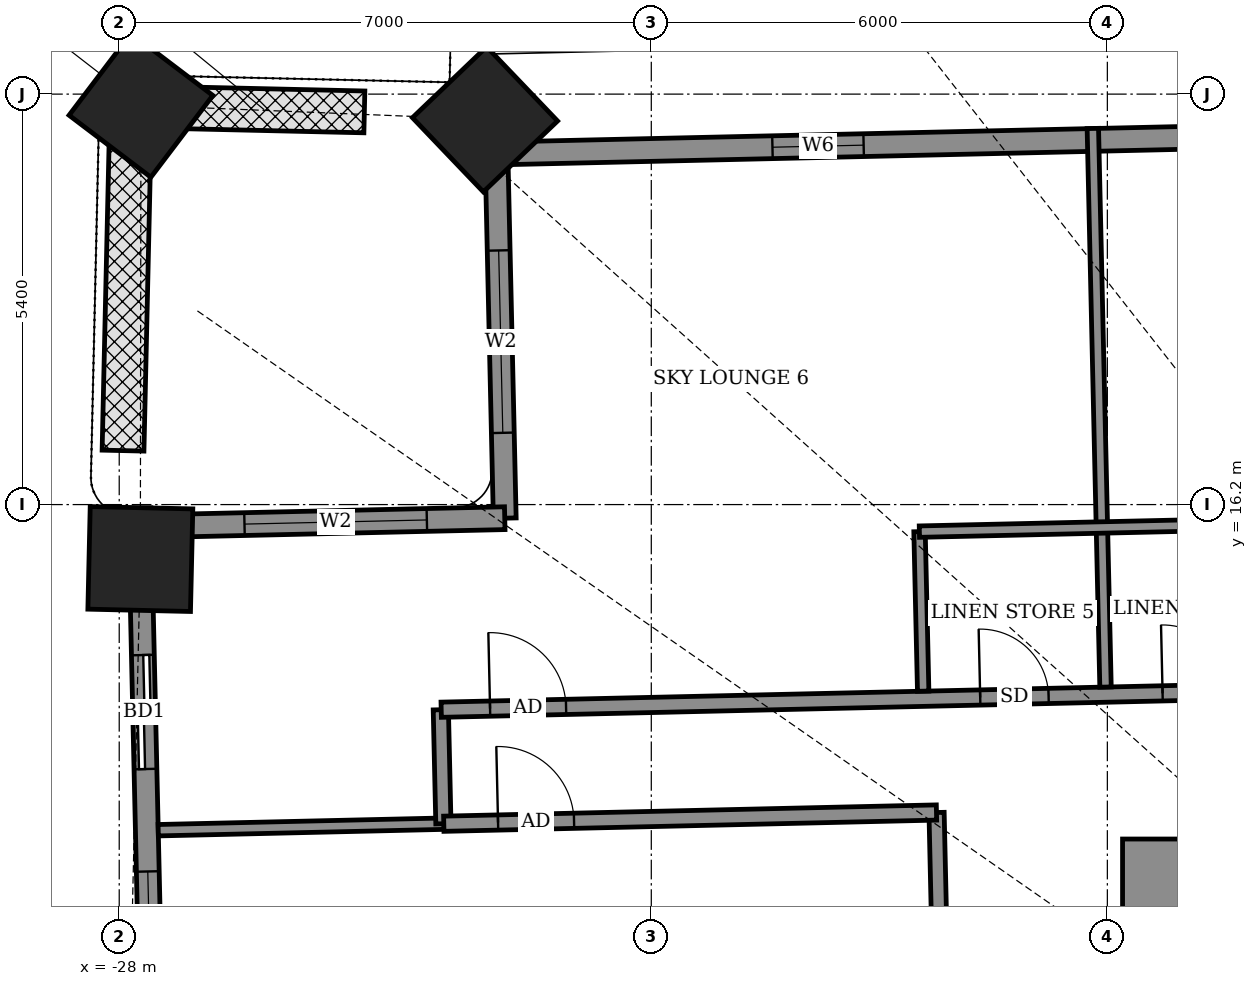
"""IFC4 building model, lengths in metres.
Left out: names, types, materials, properties, quantities, classifications, styles, units other than length and angle.
Written with IfcOpenShell. Run it as: python <this file> out.ifc"""

import sys

from ifc_helpers import new_model, si_unit, direction, frame, frame_2d, origin, origin_2d, place, context, subcontext, project, spatial, rectangle, extrude, element, fill, save


model = new_model("IFC4")
c1 = context("Model", 3, precision=1e-05, world=origin(), true_north=direction((0.0, 1.0)))
c2 = subcontext(c1, "Body", "Model", "MODEL_VIEW")
j1 = project(units=[si_unit("LENGTHUNIT", "METRE"), si_unit("PLANEANGLEUNIT", "RADIAN")], contexts=[c1])
p1 = place(None, origin())
s1 = spatial("IfcSite", under=j1, at=p1, CompositionType="ELEMENT")
p2 = place(p1, origin())
s2 = spatial("IfcBuilding", under=s1, at=p2, CompositionType="ELEMENT")
p3 = place(p2, frame((0.0, 0.0, 125.5)))
s3 = spatial("IfcBuildingStorey", under=s2, at=p3, CompositionType="ELEMENT", Elevation=125.5)
for number, where, z_axis, x_axis in (
    (1, (-23.188, 21.268, -0.55), (0.0, 0.0, 1.0), (-0.723, -0.691, 0.0)),
    (2, (-27.714, 21.452, -0.55), (0.0, 0.0, 1.0), (-0.604, -0.797, 0.0)),
    (3, (-27.722, 15.484, -0.55), (0.0, 0.0, 1.0), (-0.023, -1.0, 0.0)),
):
    element("IfcColumn", number, at=place(p3, frame(where, z_axis=z_axis, x_axis=x_axis)), inside=s3, PredefinedType="COLUMN", context=c2, shape_type="SweptSolid", body=[
        extrude(rectangle(XDim=1.35, YDim=1.35, at=origin_2d()), origin(), (0.0, 0.0, 1.0), 4.6),
    ])
p4 = place(p3, frame((19.396, 21.782, 0.0), z_axis=(0.0, 0.0, 1.0), x_axis=(-0.999742636707, -0.022686126826, 0.0)))
e4 = element("IfcWall", 4, at=p4, inside=s3, PredefinedType="SOLIDWALL", context=c2, shape_type="SweptSolid", body=[
    extrude(rectangle(XDim=42.444, YDim=0.3, at=frame_2d((21.222, 0.0))), origin(), (0.0, 0.0, 1.0), 2.35),
])
p5 = place(p4, frame((3.097, 0.0, 0.0)))
e5 = element("IfcOpeningElement", 5, at=p5, cuts=e4, PredefinedType="OPENING", context=c2, shape_type="SweptSolid", body=[
    extrude(rectangle(XDim=1.5, YDim=2.0, at=frame_2d((0.75, 1.0))), frame((0.0, 0.16, 0.0), z_axis=(0.0, -1.0, 0.0), x_axis=(1.0, 0.0, 0.0)), (0.0, 0.0, 1.0), 0.32),
])
p6 = place(p4, frame((11.269, 0.0, 0.5)))
e6 = element("IfcOpeningElement", 6, at=p6, cuts=e4, PredefinedType="OPENING", context=c2, shape_type="SweptSolid", body=[
    extrude(rectangle(XDim=1.2, YDim=1.1, at=frame_2d((0.6, 0.55))), frame((0.0, 0.16, 0.0), z_axis=(0.0, -1.0, 0.0), x_axis=(1.0, 0.0, 0.0)), (0.0, 0.0, 1.0), 0.32),
])
p7 = place(p4, frame((17.594, 0.0, 0.0)))
e7 = element("IfcOpeningElement", 7, at=p7, cuts=e4, PredefinedType="OPENING", context=c2, shape_type="SweptSolid", body=[
    extrude(rectangle(XDim=1.5, YDim=2.0, at=frame_2d((0.75, 1.0))), frame((0.0, 0.16, 0.0), z_axis=(0.0, -1.0, 0.0), x_axis=(1.0, 0.0, 0.0)), (0.0, 0.0, 1.0), 0.32),
])
p8 = place(p4, frame((22.919, 0.0, 0.0)))
e8 = element("IfcOpeningElement", 8, at=p8, cuts=e4, PredefinedType="OPENING", context=c2, shape_type="SweptSolid", body=[
    extrude(rectangle(XDim=1.5, YDim=2.0, at=frame_2d((0.75, 1.0))), frame((0.0, 0.16, 0.0), z_axis=(0.0, -1.0, 0.0), x_axis=(1.0, 0.0, 0.0)), (0.0, 0.0, 1.0), 0.32),
])
p9 = place(p4, frame((29.969, 0.0, 0.5)))
e9 = element("IfcOpeningElement", 9, at=p9, cuts=e4, PredefinedType="OPENING", context=c2, shape_type="SweptSolid", body=[
    extrude(rectangle(XDim=1.2, YDim=1.1, at=frame_2d((0.6, 0.55))), frame((0.0, 0.16, 0.0), z_axis=(0.0, -1.0, 0.0), x_axis=(1.0, 0.0, 0.0)), (0.0, 0.0, 1.0), 0.32),
])
p10 = place(p4, frame((37.612, 0.0, 0.5)))
e10 = element("IfcOpeningElement", 10, at=p10, cuts=e4, PredefinedType="OPENING", context=c2, shape_type="SweptSolid", body=[
    extrude(rectangle(XDim=1.2, YDim=1.1, at=frame_2d((0.6, 0.55))), frame((0.0, 0.16, 0.0), z_axis=(0.0, -1.0, 0.0), x_axis=(1.0, 0.0, 0.0)), (0.0, 0.0, 1.0), 0.32),
])
p11 = place(p3, frame((-23.037, 20.819, 0.0), z_axis=(0.0, 0.0, 1.0), x_axis=(0.022738738327, -0.999741441463, 0.0)))
e11 = element("IfcWall", 11, at=p11, inside=s3, PredefinedType="SOLIDWALL", context=c2, shape_type="SweptSolid", body=[
    extrude(rectangle(XDim=4.799, YDim=0.3, at=frame_2d((2.4, 0.0))), origin(), (0.0, 0.0, 1.0), 2.55),
])
p12 = place(p11, frame((1.276, 0.0, 0.9)))
e12 = element("IfcOpeningElement", 12, at=p12, cuts=e11, PredefinedType="OPENING", context=c2, shape_type="SweptSolid", body=[
    extrude(rectangle(XDim=2.4, YDim=1.5, at=frame_2d((1.2, 0.75))), frame((0.0, 0.16, 0.0), z_axis=(0.0, -1.0, 0.0), x_axis=(1.0, 0.0, 0.0)), (0.0, 0.0, 1.0), 0.32),
])
p13 = place(p3, frame((-22.928, 16.021, 0.0), z_axis=(0.0, 0.0, 1.0), x_axis=(-0.999742701292, -0.022683280499, 0.0)))
e13 = element("IfcWall", 13, at=p13, inside=s3, PredefinedType="SOLIDWALL", context=c2, shape_type="SweptSolid", body=[
    extrude(rectangle(XDim=4.8, YDim=0.3, at=frame_2d((2.4, 0.0))), origin(), (0.0, 0.0, 1.0), 2.55),
])
p14 = place(p13, frame((1.025, 0.0, 0.9)))
e14 = element("IfcOpeningElement", 14, at=p14, cuts=e13, PredefinedType="OPENING", context=c2, shape_type="SweptSolid", body=[
    extrude(rectangle(XDim=2.4, YDim=1.5, at=frame_2d((1.2, 0.75))), frame((0.0, 0.16, 0.0), z_axis=(0.0, -1.0, 0.0), x_axis=(1.0, 0.0, 0.0)), (0.0, 0.0, 1.0), 0.32),
])
p15 = place(p3, frame((-27.733, 16.154, 0.0), z_axis=(0.0, 0.0, 1.0), x_axis=(0.022721884592, -0.999741824653, 0.0)))
e15 = element("IfcWall", 15, at=p15, inside=s3, PredefinedType="SOLIDWALL", context=c2, shape_type="SweptSolid", body=[
    extrude(rectangle(XDim=11.572, YDim=0.3, at=frame_2d((5.786, 0.0))), origin(), (0.0, 0.0, 1.0), 2.65),
])
p16 = place(p15, frame((1.934, 0.0, 0.0)))
e16 = element("IfcOpeningElement", 16, at=p16, cuts=e15, PredefinedType="OPENING", context=c2, shape_type="SweptSolid", body=[
    extrude(rectangle(XDim=1.5, YDim=2.4, at=frame_2d((0.75, 1.2))), frame((0.0, 0.16, 0.0), z_axis=(0.0, -1.0, 0.0), x_axis=(1.0, 0.0, 0.0)), (0.0, 0.0, 1.0), 0.32),
])
p17 = place(p15, frame((4.782, 0.0, 0.9)))
e17 = element("IfcOpeningElement", 17, at=p17, cuts=e15, PredefinedType="OPENING", context=c2, shape_type="SweptSolid", body=[
    extrude(rectangle(XDim=1.2, YDim=1.5, at=frame_2d((0.6, 0.75))), frame((0.0, 0.16, 0.0), z_axis=(0.0, -1.0, 0.0), x_axis=(1.0, 0.0, 0.0)), (0.0, 0.0, 1.0), 0.32),
])
p18 = place(p15, frame((8.324, 0.0, 0.9)))
e18 = element("IfcOpeningElement", 18, at=p18, cuts=e15, PredefinedType="OPENING", context=c2, shape_type="SweptSolid", body=[
    extrude(rectangle(XDim=2.4, YDim=1.5, at=frame_2d((1.2, 0.75))), frame((0.0, 0.16, 0.0), z_axis=(0.0, -1.0, 0.0), x_axis=(1.0, 0.0, 0.0)), (0.0, 0.0, 1.0), 0.32),
])
p19 = place(p3, frame((-27.95, 16.91, 0.0), z_axis=(0.0, 0.0, 1.0), x_axis=(0.022730891996, 0.999741619894, 0.0)))
e19 = element("IfcWall", 19, at=p19, inside=s3, PredefinedType="USERDEFINED", context=c2, shape_type="SweptSolid", body=[
    extrude(rectangle(XDim=4.092, YDim=0.55, at=frame_2d((2.046, 0.0))), origin(), (0.0, 0.0, 1.0), 0.8),
])
p20 = place(p3, frame((-27.412, 21.426, 0.0), z_axis=(0.0, 0.0, 1.0), x_axis=(0.999740783297, -0.022767657165, 0.0)))
e20 = element("IfcWall", 20, at=p20, inside=s3, PredefinedType="USERDEFINED", context=c2, shape_type="SweptSolid", body=[
    extrude(rectangle(XDim=2.638, YDim=0.55, at=frame_2d((1.319, 0.0))), origin(), (0.0, 0.0, 1.0), 0.8),
])
p21 = place(p3, frame((-16.603, -16.218, 0.0), z_axis=(0.0, 0.0, 1.0), x_axis=(-0.022698146637, 0.999742363881, 0.0)))
e21 = element("IfcWall", 21, at=p21, inside=s3, PredefinedType="PARTITIONING", context=c2, shape_type="SweptSolid", body=[
    extrude(rectangle(XDim=28.374, YDim=0.2, at=frame_2d((14.187, 0.0))), origin(), (0.0, 0.0, 1.0), 2.55),
])
p22 = place(p21, frame((21.524, 0.0, 0.0)))
e22 = element("IfcOpeningElement", 22, at=p22, cuts=e21, PredefinedType="OPENING", context=c2, shape_type="SweptSolid", body=[
    extrude(rectangle(XDim=1.0, YDim=2.1, at=frame_2d((0.5, 1.05))), frame((0.0, 0.11, 0.0), z_axis=(0.0, -1.0, 0.0), x_axis=(1.0, 0.0, 0.0)), (0.0, 0.0, 1.0), 0.22),
])
p23 = place(p21, frame((23.699, 0.0, 0.0)))
e23 = element("IfcOpeningElement", 23, at=p23, cuts=e21, PredefinedType="OPENING", context=c2, shape_type="SweptSolid", body=[
    extrude(rectangle(XDim=0.9, YDim=2.1, at=frame_2d((0.45, 1.05))), frame((0.0, 0.11, 0.0), z_axis=(0.0, -1.0, 0.0), x_axis=(1.0, 0.0, 0.0)), (0.0, 0.0, 1.0), 0.22),
])
p24 = place(p21, frame((17.124, 0.0, 0.0)))
e24 = element("IfcOpeningElement", 24, at=p24, cuts=e21, PredefinedType="OPENING", context=c2, shape_type="SweptSolid", body=[
    extrude(rectangle(XDim=1.0, YDim=2.1, at=frame_2d((0.5, 1.05))), frame((0.0, 0.11, 0.0), z_axis=(0.0, -1.0, 0.0), x_axis=(1.0, 0.0, 0.0)), (0.0, 0.0, 1.0), 0.22),
])
p25 = place(p21, frame((19.449, 0.0, 0.0)))
e25 = element("IfcOpeningElement", 25, at=p25, cuts=e21, PredefinedType="OPENING", context=c2, shape_type="SweptSolid", body=[
    extrude(rectangle(XDim=0.9, YDim=2.1, at=frame_2d((0.45, 1.05))), frame((0.0, 0.11, 0.0), z_axis=(0.0, -1.0, 0.0), x_axis=(1.0, 0.0, 0.0)), (0.0, 0.0, 1.0), 0.22),
])
p26 = place(p21, frame((14.849, 0.0, 0.0)))
e26 = element("IfcOpeningElement", 26, at=p26, cuts=e21, PredefinedType="OPENING", context=c2, shape_type="SweptSolid", body=[
    extrude(rectangle(XDim=1.0, YDim=2.1, at=frame_2d((0.5, 1.05))), frame((0.0, 0.11, 0.0), z_axis=(0.0, -1.0, 0.0), x_axis=(1.0, 0.0, 0.0)), (0.0, 0.0, 1.0), 0.22),
])
p27 = place(p21, frame((12.399, 0.0, 0.0)))
e27 = element("IfcOpeningElement", 27, at=p27, cuts=e21, PredefinedType="OPENING", context=c2, shape_type="SweptSolid", body=[
    extrude(rectangle(XDim=0.9, YDim=2.1, at=frame_2d((0.45, 1.05))), frame((0.0, 0.11, 0.0), z_axis=(0.0, -1.0, 0.0), x_axis=(1.0, 0.0, 0.0)), (0.0, 0.0, 1.0), 0.22),
])
p28 = place(p21, frame((7.749, 0.0, 0.0)))
e28 = element("IfcOpeningElement", 28, at=p28, cuts=e21, PredefinedType="OPENING", context=c2, shape_type="SweptSolid", body=[
    extrude(rectangle(XDim=1.0, YDim=2.1, at=frame_2d((0.5, 1.05))), frame((0.0, 0.11, 0.0), z_axis=(0.0, -1.0, 0.0), x_axis=(1.0, 0.0, 0.0)), (0.0, 0.0, 1.0), 0.22),
])
p29 = place(p21, frame((9.899, 0.0, 0.0)))
e29 = element("IfcOpeningElement", 29, at=p29, cuts=e21, PredefinedType="OPENING", context=c2, shape_type="SweptSolid", body=[
    extrude(rectangle(XDim=0.9, YDim=2.1, at=frame_2d((0.45, 1.05))), frame((0.0, 0.11, 0.0), z_axis=(0.0, -1.0, 0.0), x_axis=(1.0, 0.0, 0.0)), (0.0, 0.0, 1.0), 0.22),
])
p30 = place(p21, frame((4.374, 0.0, 0.0)))
e30 = element("IfcOpeningElement", 30, at=p30, cuts=e21, PredefinedType="OPENING", context=c2, shape_type="SweptSolid", body=[
    extrude(rectangle(XDim=1.0, YDim=2.1, at=frame_2d((0.5, 1.05))), frame((0.0, 0.11, 0.0), z_axis=(0.0, -1.0, 0.0), x_axis=(1.0, 0.0, 0.0)), (0.0, 0.0, 1.0), 0.22),
])
p31 = place(p21, frame((0.75, 0.0, 0.0)))
e31 = element("IfcOpeningElement", 31, at=p31, cuts=e21, PredefinedType="OPENING", context=c2, shape_type="SweptSolid", body=[
    extrude(rectangle(XDim=0.9, YDim=2.1, at=frame_2d((0.45, 1.05))), frame((0.0, 0.11, 0.0), z_axis=(0.0, -1.0, 0.0), x_axis=(1.0, 0.0, 0.0)), (0.0, 0.0, 1.0), 0.22),
])
p32 = place(p3, frame((-27.487, 11.916, 0.0), z_axis=(0.0, 0.0, 1.0), x_axis=(0.999739047234, 0.022843761417, 0.0)))
e32 = element("IfcWall", 32, at=p32, inside=s3, PredefinedType="PARTITIONING", context=c2, shape_type="SweptSolid", body=[
    extrude(rectangle(XDim=3.762, YDim=0.15, at=frame_2d((1.881, 0.0))), origin(), (0.0, 0.0, 1.0), 2.65),
])
p33 = place(p3, frame((-23.735, 12.001, 0.0), z_axis=(0.0, 0.0, 1.0), x_axis=(-0.022617910375, 0.999744182344, 0.0)))
e33 = element("IfcWall", 33, at=p33, inside=s3, PredefinedType="PARTITIONING", context=c2, shape_type="SweptSolid", body=[
    extrude(rectangle(XDim=1.5, YDim=0.2, at=frame_2d((0.75, 0.0))), origin(), (0.0, 0.0, 1.0), 4.05),
])
p34 = place(p3, frame((-23.73, 12.001, 0.0), z_axis=(0.0, 0.0, 1.0), x_axis=(0.999739614647, 0.022818915498, 0.0)))
e34 = element("IfcWall", 34, at=p34, inside=s3, PredefinedType="PARTITIONING", context=c2, shape_type="SweptSolid", body=[
    extrude(rectangle(XDim=6.484, YDim=0.2, at=frame_2d((3.242, 0.0))), origin(), (0.0, 0.0, 1.0), 2.55),
])
p35 = place(p34, frame((0.714, 0.0, 0.0)))
e35 = element("IfcOpeningElement", 35, at=p35, cuts=e34, PredefinedType="OPENING", context=c2, shape_type="SweptSolid", body=[
    extrude(rectangle(XDim=1.0, YDim=2.1, at=frame_2d((0.5, 1.05))), frame((0.0, 0.11, 0.0), z_axis=(0.0, -1.0, 0.0), x_axis=(1.0, 0.0, 0.0)), (0.0, 0.0, 1.0), 0.22),
])
p36 = place(p3, frame((-23.764, 13.501, 0.0), z_axis=(0.0, 0.0, 1.0), x_axis=(0.999742440266, 0.022694782029, 0.0)))
e36 = element("IfcWall", 36, at=p36, inside=s3, PredefinedType="PARTITIONING", context=c2, shape_type="SweptSolid", body=[
    extrude(rectangle(XDim=41.245, YDim=0.2, at=frame_2d((20.622, 0.0))), origin(), (0.0, 0.0, 1.0), 2.35),
])
p37 = place(p36, frame((40.045, 0.0, 0.0)))
e37 = element("IfcOpeningElement", 37, at=p37, cuts=e36, PredefinedType="OPENING", context=c2, shape_type="SweptSolid", body=[
    extrude(rectangle(XDim=1.0, YDim=2.1, at=frame_2d((0.5, 1.05))), frame((0.0, 0.11, 0.0), z_axis=(0.0, -1.0, 0.0), x_axis=(1.0, 0.0, 0.0)), (0.0, 0.0, 1.0), 0.22),
])
p38 = place(p36, frame((29.668, 0.0, 0.0)))
e38 = element("IfcOpeningElement", 38, at=p38, cuts=e36, PredefinedType="OPENING", context=c2, shape_type="SweptSolid", body=[
    extrude(rectangle(XDim=1.0, YDim=2.1, at=frame_2d((0.5, 1.05))), frame((0.0, 0.11, 0.0), z_axis=(0.0, -1.0, 0.0), x_axis=(1.0, 0.0, 0.0)), (0.0, 0.0, 1.0), 0.22),
])
p39 = place(p36, frame((33.743, 0.0, 0.0)))
e39 = element("IfcOpeningElement", 39, at=p39, cuts=e36, PredefinedType="OPENING", context=c2, shape_type="SweptSolid", body=[
    extrude(rectangle(XDim=0.9, YDim=2.1, at=frame_2d((0.45, 1.05))), frame((0.0, 0.11, 0.0), z_axis=(0.0, -1.0, 0.0), x_axis=(1.0, 0.0, 0.0)), (0.0, 0.0, 1.0), 0.22),
])
p40 = place(p36, frame((25.743, 0.0, 0.0)))
e40 = element("IfcOpeningElement", 40, at=p40, cuts=e36, PredefinedType="OPENING", context=c2, shape_type="SweptSolid", body=[
    extrude(rectangle(XDim=0.9, YDim=2.1, at=frame_2d((0.45, 1.05))), frame((0.0, 0.11, 0.0), z_axis=(0.0, -1.0, 0.0), x_axis=(1.0, 0.0, 0.0)), (0.0, 0.0, 1.0), 0.22),
])
p41 = place(p36, frame((19.168, 0.0, 0.0)))
e41 = element("IfcOpeningElement", 41, at=p41, cuts=e36, PredefinedType="OPENING", context=c2, shape_type="SweptSolid", body=[
    extrude(rectangle(XDim=1.0, YDim=2.1, at=frame_2d((0.5, 1.05))), frame((0.0, 0.11, 0.0), z_axis=(0.0, -1.0, 0.0), x_axis=(1.0, 0.0, 0.0)), (0.0, 0.0, 1.0), 0.22),
])
p42 = place(p36, frame((13.468, 0.0, 0.0)))
e42 = element("IfcOpeningElement", 42, at=p42, cuts=e36, PredefinedType="OPENING", context=c2, shape_type="SweptSolid", body=[
    extrude(rectangle(XDim=1.0, YDim=2.1, at=frame_2d((0.5, 1.05))), frame((0.0, 0.11, 0.0), z_axis=(0.0, -1.0, 0.0), x_axis=(1.0, 0.0, 0.0)), (0.0, 0.0, 1.0), 0.22),
])
p43 = place(p36, frame((9.493, 0.0, 0.0)))
e43 = element("IfcOpeningElement", 43, at=p43, cuts=e36, PredefinedType="OPENING", context=c2, shape_type="SweptSolid", body=[
    extrude(rectangle(XDim=0.9, YDim=2.1, at=frame_2d((0.45, 1.05))), frame((0.0, 0.11, 0.0), z_axis=(0.0, -1.0, 0.0), x_axis=(1.0, 0.0, 0.0)), (0.0, 0.0, 1.0), 0.22),
])
p44 = place(p36, frame((0.643, 0.0, 0.0)))
e44 = element("IfcOpeningElement", 44, at=p44, cuts=e36, PredefinedType="OPENING", context=c2, shape_type="SweptSolid", body=[
    extrude(rectangle(XDim=1.0, YDim=2.1, at=frame_2d((0.5, 1.05))), frame((0.0, 0.11, 0.0), z_axis=(0.0, -1.0, 0.0), x_axis=(1.0, 0.0, 0.0)), (0.0, 0.0, 1.0), 0.22),
])
p45 = place(p36, frame((7.093, 0.0, 0.0)))
e45 = element("IfcOpeningElement", 45, at=p45, cuts=e36, PredefinedType="OPENING", context=c2, shape_type="SweptSolid", body=[
    extrude(rectangle(XDim=0.9, YDim=2.1, at=frame_2d((0.45, 1.05))), frame((0.0, 0.11, 0.0), z_axis=(0.0, -1.0, 0.0), x_axis=(1.0, 0.0, 0.0)), (0.0, 0.0, 1.0), 0.22),
])
p46 = place(p3, frame((-17.423, 13.745, 0.0), z_axis=(0.0, 0.0, 1.0), x_axis=(-0.022792727877, 0.999740212033, 0.0)))
e46 = element("IfcWall", 46, at=p46, inside=s3, PredefinedType="PARTITIONING", context=c2, shape_type="SweptSolid", body=[
    extrude(rectangle(XDim=2.099, YDim=0.15, at=frame_2d((1.05, 0.0))), origin(), (0.0, 0.0, 1.0), 2.55),
])
p47 = place(p3, frame((-15.024, 13.799, 0.0), z_axis=(0.0, 0.0, 1.0), x_axis=(-0.022717633107, 0.999741921271, 0.0)))
e47 = element("IfcWall", 47, at=p47, inside=s3, PredefinedType="PARTITIONING", context=c2, shape_type="SweptSolid", body=[
    extrude(rectangle(XDim=7.351, YDim=0.15, at=frame_2d((3.675, 0.0))), origin(), (0.0, 0.0, 1.0), 2.35),
])
p48 = place(p3, frame((-17.473, 15.844, 0.0), z_axis=(0.0, 0.0, 1.0), x_axis=(0.999742675121, 0.022684433919, 0.0)))
e48 = element("IfcWall", 48, at=p48, inside=s3, PredefinedType="PARTITIONING", context=c2, shape_type="SweptSolid", body=[
    extrude(rectangle(XDim=4.8, YDim=0.15, at=frame_2d((2.4, 0.0))), origin(), (0.0, 0.0, 1.0), 2.35),
])
p49 = place(p3, frame((-14.8, 11.3, 0.0), z_axis=(0.0, 0.0, 1.0), x_axis=(1.0, 0.0, 0.0)))
e49 = element("IfcWall", 49, at=p49, inside=s3, PredefinedType="SHEAR", context=c2, shape_type="SweptSolid", body=[
    extrude(rectangle(XDim=29.6, YDim=1.0, at=frame_2d((14.8, 0.0))), origin(), (0.0, 0.0, 1.0), 4.6),
])
p50 = place(p10, origin())
e50 = element("IfcWindow", 50, at=p50, inside=s3, PartitioningType="SINGLE_PANEL", PredefinedType="WINDOW", context=c2, shape_type="SweptSolid", body=[
    extrude(rectangle(XDim=1.2, YDim=1.1, at=frame_2d((0.6, 0.55))), frame((0.0, 0.03, 0.0), z_axis=(0.0, -1.0, 0.0), x_axis=(1.0, 0.0, 0.0)), (0.0, 0.0, 1.0), 0.06),
])
fill(e10, e50)
p51 = place(p12, origin())
e51 = element("IfcWindow", 51, at=p51, inside=s3, PartitioningType="DOUBLE_PANEL_VERTICAL", PredefinedType="WINDOW", context=c2, shape_type="SweptSolid", body=[
    extrude(rectangle(XDim=2.4, YDim=1.5, at=frame_2d((1.2, 0.75))), frame((0.0, 0.03, 0.0), z_axis=(0.0, -1.0, 0.0), x_axis=(1.0, 0.0, 0.0)), (0.0, 0.0, 1.0), 0.06),
])
fill(e12, e51)
p52 = place(p14, origin())
e52 = element("IfcWindow", 52, at=p52, inside=s3, PartitioningType="DOUBLE_PANEL_VERTICAL", PredefinedType="WINDOW", context=c2, shape_type="SweptSolid", body=[
    extrude(rectangle(XDim=2.4, YDim=1.5, at=frame_2d((1.2, 0.75))), frame((0.0, 0.03, 0.0), z_axis=(0.0, -1.0, 0.0), x_axis=(1.0, 0.0, 0.0)), (0.0, 0.0, 1.0), 0.06),
])
fill(e14, e52)
p53 = place(p16, origin())
e53 = element("IfcDoor", 53, at=p53, inside=s3, OperationType="SLIDING_TO_LEFT", PredefinedType="DOOR", context=c2, shape_type="SweptSolid", body=[
    extrude(rectangle(XDim=1.5, YDim=2.4, at=frame_2d((0.75, 1.2))), frame((0.0, 0.025, 0.0), z_axis=(0.0, -1.0, 0.0), x_axis=(1.0, 0.0, 0.0)), (0.0, 0.0, 1.0), 0.05),
])
fill(e16, e53)
p54 = place(p17, origin())
e54 = element("IfcWindow", 54, at=p54, inside=s3, PartitioningType="SINGLE_PANEL", PredefinedType="WINDOW", context=c2, shape_type="SweptSolid", body=[
    extrude(rectangle(XDim=1.2, YDim=1.5, at=frame_2d((0.6, 0.75))), frame((0.0, 0.03, 0.0), z_axis=(0.0, -1.0, 0.0), x_axis=(1.0, 0.0, 0.0)), (0.0, 0.0, 1.0), 0.06),
])
fill(e17, e54)
p55 = place(p43, origin())
e55 = element("IfcDoor", 55, at=p55, inside=s3, OperationType="SINGLE_SWING_LEFT", PredefinedType="DOOR", context=c2, shape_type="SweptSolid", body=[
    extrude(rectangle(XDim=0.9, YDim=2.1, at=frame_2d((0.45, 1.05))), frame((0.0, 0.025, 0.0), z_axis=(0.0, -1.0, 0.0), x_axis=(1.0, 0.0, 0.0)), (0.0, 0.0, 1.0), 0.05),
])
fill(e43, e55)
p56 = place(p44, origin())
e56 = element("IfcDoor", 56, at=p56, inside=s3, OperationType="SINGLE_SWING_LEFT", PredefinedType="DOOR", context=c2, shape_type="SweptSolid", body=[
    extrude(rectangle(XDim=1.0, YDim=2.1, at=frame_2d((0.5, 1.05))), frame((0.0, 0.025, 0.0), z_axis=(0.0, -1.0, 0.0), x_axis=(1.0, 0.0, 0.0)), (0.0, 0.0, 1.0), 0.05),
])
fill(e44, e56)
p57 = place(p45, origin())
e57 = element("IfcDoor", 57, at=p57, inside=s3, OperationType="SINGLE_SWING_RIGHT", PredefinedType="DOOR", context=c2, shape_type="SweptSolid", body=[
    extrude(rectangle(XDim=0.9, YDim=2.1, at=frame_2d((0.45, 1.05))), frame((0.0, 0.025, 0.0), z_axis=(0.0, -1.0, 0.0), x_axis=(1.0, 0.0, 0.0)), (0.0, 0.0, 1.0), 0.05),
])
fill(e45, e57)
p58 = place(p35, origin())
e58 = element("IfcDoor", 58, at=p58, inside=s3, OperationType="SINGLE_SWING_RIGHT", PredefinedType="DOOR", context=c2, shape_type="SweptSolid", body=[
    extrude(rectangle(XDim=1.0, YDim=2.1, at=frame_2d((0.5, 1.05))), frame((0.0, 0.025, 0.0), z_axis=(0.0, -1.0, 0.0), x_axis=(1.0, 0.0, 0.0)), (0.0, 0.0, 1.0), 0.05),
])
fill(e35, e58)
save(model, sys.argv[1])
